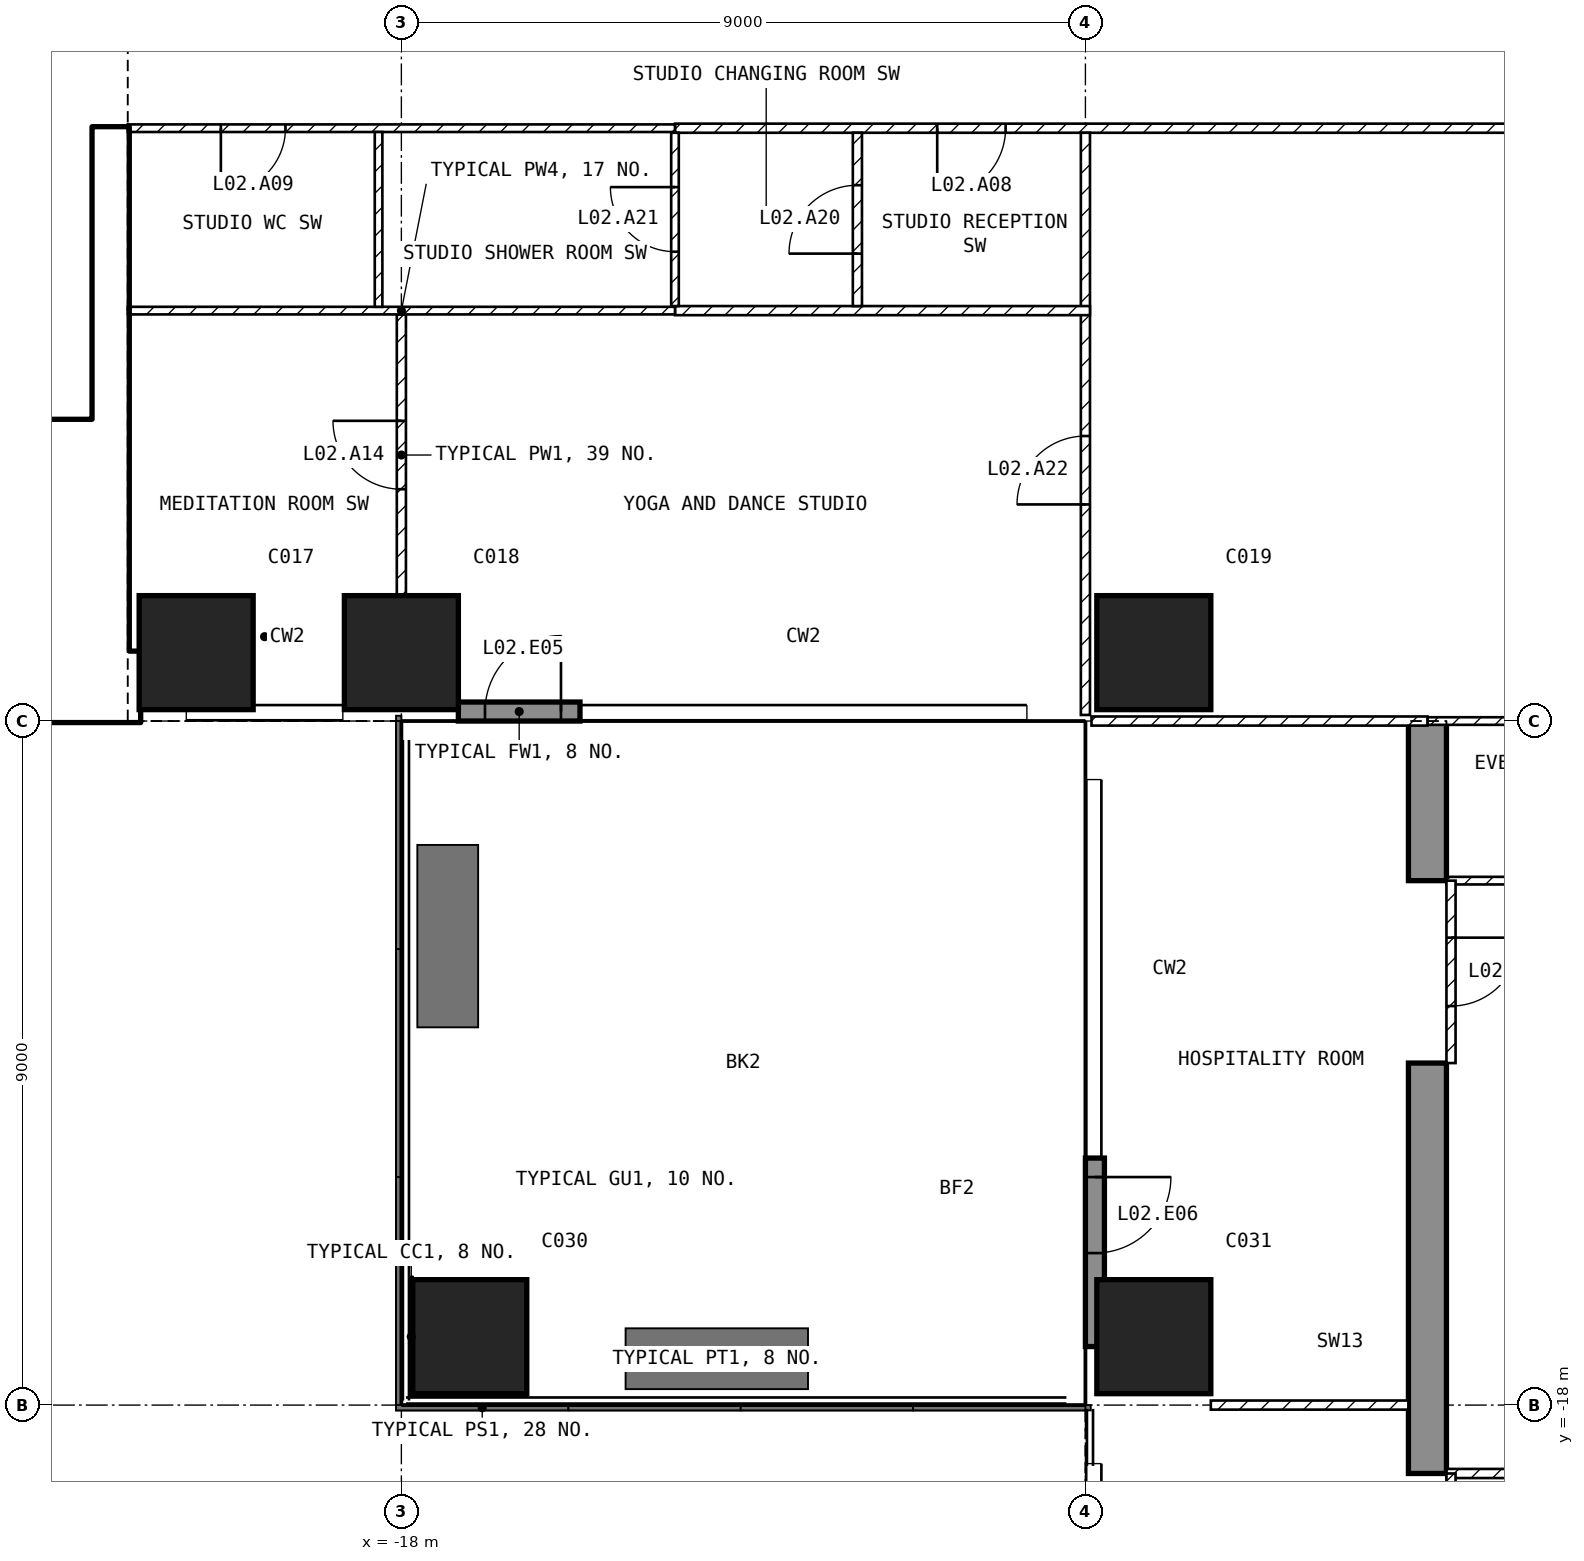
"""IFC4 building model, lengths in metres.
Left out: names, types, materials, properties, quantities, classifications, styles, units other than length and angle.
Written with IfcOpenShell. Run it as: python <this file> out.ifc"""

import sys

from ifc_helpers import new_model, si_unit, direction, frame, frame_2d, origin, origin_2d, place, context, subcontext, project, spatial, polyline, rectangle, outline, extrude, element, fill, save


model = new_model("IFC4")
c1 = context("Model", 3, precision=1e-05, world=origin(), true_north=direction((0.0, 1.0)))
c2 = subcontext(c1, "Body", "Model", "MODEL_VIEW")
j1 = project(units=[si_unit("LENGTHUNIT", "METRE"), si_unit("PLANEANGLEUNIT", "RADIAN")], contexts=[c1])
p1 = place(None, origin())
s1 = spatial("IfcSite", under=j1, at=p1, CompositionType="ELEMENT")
p2 = place(p1, origin())
s2 = spatial("IfcBuilding", under=s1, at=p2, CompositionType="ELEMENT")
p3 = place(p2, frame((0.0, 0.0, 21.0)))
s3 = spatial("IfcBuildingStorey", under=s2, at=p3, CompositionType="ELEMENT", Elevation=21.0)
for number, where, z_axis, x_axis in (
    (1, (-20.7, -8.1, -0.3), (0.0, 0.0, 1.0), (1.0, 0.0, 0.0)),
    (2, (-18.0, -8.1, -0.3), (0.0, 0.0, 1.0), (1.0, 0.0, 0.0)),
):
    element("IfcColumn", number, at=place(p3, frame(where, z_axis=z_axis, x_axis=x_axis)), inside=s3, PredefinedType="COLUMN", context=c2, shape_type="SweptSolid", body=[
        extrude(rectangle(XDim=1.5, YDim=1.5, at=origin_2d()), origin(), (0.0, 0.0, 1.0), 5.85),
    ])
for number, where, z_axis, x_axis in (
    (3, (-8.1, -17.1, -1.4), (0.0, 0.0, 1.0), (1.0, 0.0, 0.0)),
    (4, (-8.1, -8.1, -1.4), (0.0, 0.0, 1.0), (1.0, 0.0, 0.0)),
):
    element("IfcColumn", number, at=place(p3, frame(where, z_axis=z_axis, x_axis=x_axis)), inside=s3, PredefinedType="COLUMN", context=c2, shape_type="SweptSolid", body=[
        extrude(rectangle(XDim=1.5, YDim=1.5, at=origin_2d()), origin(), (0.0, 0.0, 1.0), 6.95),
    ])
p4 = place(p3, frame((-17.1, -17.1, -0.3), z_axis=(0.0, 0.0, 1.0), x_axis=(1.0, 0.0, 0.0)))
e5 = element("IfcColumn", 5, at=p4, inside=s3, PredefinedType="COLUMN", context=c2, shape_type="SweptSolid", body=[
    extrude(rectangle(XDim=1.5, YDim=1.5, at=origin_2d()), origin(), (0.0, 0.0, 1.0), 5.85),
])
p5 = place(p3, frame((-4.75, -25.35, -0.3), z_axis=(1.0, 0.0, 0.0), x_axis=(0.0, 1.0, 0.0)))
e6 = element("IfcWall", 6, at=p5, inside=s3, PredefinedType="SHEAR", context=c2, shape_type="SweptSolid", body=[
    extrude(outline(polyline([(0.0, 0.0), (4.05, 0.0), (4.05, 2.7), (6.45, 2.7), (6.45, 0.0), (11.85, 0.0), (11.85, 2.7), (14.25, 2.7), (14.25, 0.0), (16.35, 0.0), (16.35, 5.85), (0.0, 5.85), (0.0, 0.0)])), origin(), (0.0, 0.0, 1.0), 0.5),
])
p6 = place(p3, frame((-17.25, -8.875, 0.0), z_axis=(0.0, 0.0, 1.0), x_axis=(1.0, 0.0, 0.0)))
e7 = element("IfcWall", 7, at=p6, inside=s3, PredefinedType="SOLIDWALL", context=c2, shape_type="SweptSolid", body=[
    extrude(rectangle(XDim=1.6, YDim=0.25, at=frame_2d((0.8, 0.0))), origin(), (0.0, 0.0, 1.0), 5.55),
])
p7 = place(p6, frame((0.35, 0.0, 0.0)))
e8 = element("IfcOpeningElement", 8, at=p7, cuts=e7, PredefinedType="OPENING", context=c2, shape_type="SweptSolid", body=[
    extrude(rectangle(XDim=1.0, YDim=2.4, at=frame_2d((0.5, 1.2))), frame((0.0, 0.135, 0.0), z_axis=(0.0, -1.0, 0.0), x_axis=(1.0, 0.0, 0.0)), (0.0, 0.0, 1.0), 0.27),
])
p8 = place(p3, frame((-8.875, -14.75, 0.0), z_axis=(0.0, 0.0, 1.0), x_axis=(0.0, -1.0, 0.0)))
e9 = element("IfcWall", 9, at=p8, inside=s3, PredefinedType="SOLIDWALL", context=c2, shape_type="SweptSolid", body=[
    extrude(rectangle(XDim=2.48, YDim=0.25, at=frame_2d((1.24, 0.0))), origin(), (0.0, 0.0, 1.0), 5.55),
])
p9 = place(p8, frame((0.25, 0.0, 0.0)))
e10 = element("IfcOpeningElement", 10, at=p9, cuts=e9, PredefinedType="OPENING", context=c2, shape_type="SweptSolid", body=[
    extrude(rectangle(XDim=1.0, YDim=2.4, at=frame_2d((0.5, 1.2))), frame((0.0, 0.135, 0.0), z_axis=(0.0, -1.0, 0.0), x_axis=(1.0, 0.0, 0.0)), (0.0, 0.0, 1.0), 0.27),
])
p10 = place(p3, frame((-32.4, -8.55, 0.0), z_axis=(0.0, 0.0, 1.0), x_axis=(1.0, 0.0, 0.0)))
e11 = element("IfcWall", 11, at=p10, inside=s3, PredefinedType="SHEAR", context=c2, shape_type="SweptSolid", body=[
    extrude(rectangle(XDim=10.95, YDim=0.9, at=frame_2d((5.475, 0.0))), origin(), (0.0, 0.0, 1.0), 5.55),
])
p11 = place(p3, frame((-21.825, -8.1, 0.0), z_axis=(0.0, 0.0, 1.0), x_axis=(0.0, 1.0, 0.0)))
e12 = element("IfcWall", 12, at=p11, inside=s3, PredefinedType="SHEAR", context=c2, shape_type="SweptSolid", body=[
    extrude(rectangle(XDim=6.9, YDim=0.45, at=frame_2d((3.45, 0.0))), origin(), (0.0, 0.0, 1.0), 5.55),
])
p12 = place(p3, frame((-28.35, -5.15, 0.0), z_axis=(0.0, 0.0, 1.0), x_axis=(1.0, 0.0, 0.0)))
e13 = element("IfcWall", 13, at=p12, inside=s3, PredefinedType="SOLIDWALL", context=c2, shape_type="SweptSolid", body=[
    extrude(rectangle(XDim=6.3, YDim=0.2, at=frame_2d((3.15, 0.0))), origin(), (0.0, 0.0, 1.0), 5.55),
])
p13 = place(p12, frame((5.1, 0.0, 0.0)))
e14 = element("IfcOpeningElement", 14, at=p13, cuts=e13, PredefinedType="OPENING", context=c2, shape_type="SweptSolid", body=[
    extrude(rectangle(XDim=1.0, YDim=2.1, at=frame_2d((0.5, 1.05))), frame((0.0, 0.11, 0.0), z_axis=(0.0, -1.0, 0.0), x_axis=(1.0, 0.0, 0.0)), (0.0, 0.0, 1.0), 0.22),
])
p14 = place(p3, frame((18.6, -1.2, 0.0), z_axis=(0.0, 0.0, 1.0), x_axis=(-1.0, 0.0, 0.0)))
e15 = element("IfcWall", 15, at=p14, inside=s3, PredefinedType="PARTITIONING", context=c2, shape_type="SweptSolid", body=[
    extrude(rectangle(XDim=33.0, YDim=0.12, at=frame_2d((16.5, 0.0))), origin(), (0.0, 0.0, 1.0), 5.55),
])
p15 = place(p14, frame((17.7, 0.0, 0.0)))
e16 = element("IfcOpeningElement", 16, at=p15, cuts=e15, PredefinedType="OPENING", context=c2, shape_type="SweptSolid", body=[
    extrude(rectangle(XDim=1.8, YDim=2.1, at=frame_2d((0.9, 1.05))), frame((0.0, 0.07, 0.0), z_axis=(0.0, -1.0, 0.0), x_axis=(1.0, 0.0, 0.0)), (0.0, 0.0, 1.0), 0.14),
])
p16 = place(p14, frame((2.25, 0.0, 0.0)))
e17 = element("IfcOpeningElement", 17, at=p16, cuts=e15, PredefinedType="OPENING", context=c2, shape_type="SweptSolid", body=[
    extrude(rectangle(XDim=0.9, YDim=2.1, at=frame_2d((0.45, 1.05))), frame((0.0, 0.07, 0.0), z_axis=(0.0, -1.0, 0.0), x_axis=(1.0, 0.0, 0.0)), (0.0, 0.0, 1.0), 0.14),
])
p17 = place(p14, frame((28.65, 0.0, 0.0)))
e18 = element("IfcOpeningElement", 18, at=p17, cuts=e15, PredefinedType="OPENING", context=c2, shape_type="SweptSolid", body=[
    extrude(rectangle(XDim=0.9, YDim=2.1, at=frame_2d((0.45, 1.05))), frame((0.0, 0.07, 0.0), z_axis=(0.0, -1.0, 0.0), x_axis=(1.0, 0.0, 0.0)), (0.0, 0.0, 1.0), 0.14),
])
p18 = place(p3, frame((-14.4, -1.2, 0.0), z_axis=(0.0, 0.0, 1.0), x_axis=(-1.0, 0.0, 0.0)))
e19 = element("IfcWall", 19, at=p18, inside=s3, PredefinedType="PARTITIONING", context=c2, shape_type="SweptSolid", body=[
    extrude(rectangle(XDim=7.2, YDim=0.1, at=frame_2d((3.6, 0.0))), origin(), (0.0, 0.0, 1.0), 5.55),
])
p19 = place(p18, frame((5.125, 0.0, 0.0)))
e20 = element("IfcOpeningElement", 20, at=p19, cuts=e19, PredefinedType="OPENING", context=c2, shape_type="SweptSolid", body=[
    extrude(rectangle(XDim=0.85, YDim=2.1, at=frame_2d((0.425, 1.05))), frame((0.0, 0.06, 0.0), z_axis=(0.0, -1.0, 0.0), x_axis=(1.0, 0.0, 0.0)), (0.0, 0.0, 1.0), 0.12),
])
p20 = place(p3, frame((-9.0, -8.92, 0.0), z_axis=(0.0, 0.0, 1.0), x_axis=(0.0, 1.0, 0.0)))
e21 = element("IfcWall", 21, at=p20, inside=s3, PredefinedType="PARTITIONING", context=c2, shape_type="SweptSolid", body=[
    extrude(rectangle(XDim=7.66, YDim=0.12, at=frame_2d((3.83, 0.0))), origin(), (0.0, 0.0, 1.0), 5.55),
])
p21 = place(p20, frame((2.77, 0.0, 0.0)))
e22 = element("IfcOpeningElement", 22, at=p21, cuts=e21, PredefinedType="OPENING", context=c2, shape_type="SweptSolid", body=[
    extrude(rectangle(XDim=0.9, YDim=2.1, at=frame_2d((0.45, 1.05))), frame((0.0, 0.07, 0.0), z_axis=(0.0, -1.0, 0.0), x_axis=(1.0, 0.0, 0.0)), (0.0, 0.0, 1.0), 0.14),
])
p22 = place(p3, frame((-2.1, -9.0, 0.0), z_axis=(0.0, 0.0, 1.0), x_axis=(-1.0, 0.0, 0.0)))
e23 = element("IfcWall", 23, at=p22, inside=s3, PredefinedType="PARTITIONING", context=c2, shape_type="SweptSolid", body=[
    extrude(rectangle(XDim=2.4, YDim=0.1, at=frame_2d((1.2, 0.0))), origin(), (0.0, 0.0, 1.0), 5.55),
])
p23 = place(p3, frame((-4.5, -9.0, 0.0), z_axis=(0.0, 0.0, 1.0), x_axis=(-1.0, 0.0, 0.0)))
e24 = element("IfcWall", 24, at=p23, inside=s3, PredefinedType="PARTITIONING", context=c2, shape_type="SweptSolid", body=[
    extrude(rectangle(XDim=4.42, YDim=0.12, at=frame_2d((2.21, 0.0))), origin(), (0.0, 0.0, 1.0), 5.55),
])
p24 = place(p3, frame((-18.0, -7.35, 0.0), z_axis=(0.0, 0.0, 1.0), x_axis=(0.0, 1.0, 0.0)))
e25 = element("IfcWall", 25, at=p24, inside=s3, PredefinedType="PARTITIONING", context=c2, shape_type="SweptSolid", body=[
    extrude(rectangle(XDim=3.7, YDim=0.12, at=frame_2d((1.85, 0.0))), origin(), (0.0, 0.0, 1.0), 4.57),
])
p25 = place(p24, frame((1.4, 0.0, 0.0)))
e26 = element("IfcOpeningElement", 26, at=p25, cuts=e25, PredefinedType="OPENING", context=c2, shape_type="SweptSolid", body=[
    extrude(rectangle(XDim=0.9, YDim=2.1, at=frame_2d((0.45, 1.05))), frame((0.0, 0.07, 0.0), z_axis=(0.0, -1.0, 0.0), x_axis=(1.0, 0.0, 0.0)), (0.0, 0.0, 1.0), 0.14),
])
p26 = place(p3, frame((-14.4, -3.6, 0.0), z_axis=(0.0, 0.0, 1.0), x_axis=(1.0, 0.0, 0.0)))
e27 = element("IfcWall", 27, at=p26, inside=s3, PredefinedType="PARTITIONING", context=c2, shape_type="SweptSolid", body=[
    extrude(rectangle(XDim=5.46, YDim=0.12, at=frame_2d((2.73, 0.0))), origin(), (0.0, 0.0, 1.0), 5.55),
])
p27 = place(p3, frame((-21.6, -3.6, 0.0), z_axis=(0.0, 0.0, 1.0), x_axis=(1.0, 0.0, 0.0)))
e28 = element("IfcWall", 28, at=p27, inside=s3, PredefinedType="PARTITIONING", context=c2, shape_type="SweptSolid", body=[
    extrude(rectangle(XDim=7.2, YDim=0.1, at=frame_2d((3.6, 0.0))), origin(), (0.0, 0.0, 1.0), 5.55),
])
p28 = place(p3, frame((-12.0, -3.54, 0.0), z_axis=(0.0, 0.0, 1.0), x_axis=(0.0, 1.0, 0.0)))
e29 = element("IfcWall", 29, at=p28, inside=s3, PredefinedType="PARTITIONING", context=c2, shape_type="SweptSolid", body=[
    extrude(rectangle(XDim=2.28, YDim=0.12, at=frame_2d((1.14, 0.0))), origin(), (0.0, 0.0, 1.0), 5.55),
])
p29 = place(p28, frame((0.69, 0.0, 0.0)))
e30 = element("IfcOpeningElement", 30, at=p29, cuts=e29, PredefinedType="OPENING", context=c2, shape_type="SweptSolid", body=[
    extrude(rectangle(XDim=0.9, YDim=2.1, at=frame_2d((0.45, 1.05))), frame((0.0, 0.07, 0.0), z_axis=(0.0, -1.0, 0.0), x_axis=(1.0, 0.0, 0.0)), (0.0, 0.0, 1.0), 0.14),
])
p30 = place(p3, frame((-14.4, -3.54, 0.0), z_axis=(0.0, 0.0, 1.0), x_axis=(0.0, 1.0, 0.0)))
e31 = element("IfcWall", 31, at=p30, inside=s3, PredefinedType="PARTITIONING", context=c2, shape_type="SweptSolid", body=[
    extrude(rectangle(XDim=2.28, YDim=0.1, at=frame_2d((1.14, 0.0))), origin(), (0.0, 0.0, 1.0), 5.55),
])
p31 = place(p30, frame((0.715, 0.0, 0.0)))
e32 = element("IfcOpeningElement", 32, at=p31, cuts=e31, PredefinedType="OPENING", context=c2, shape_type="SweptSolid", body=[
    extrude(rectangle(XDim=0.85, YDim=2.1, at=frame_2d((0.425, 1.05))), frame((0.0, 0.06, 0.0), z_axis=(0.0, -1.0, 0.0), x_axis=(1.0, 0.0, 0.0)), (0.0, 0.0, 1.0), 0.12),
])
p32 = place(p3, frame((-18.3, -3.55, 0.0), z_axis=(0.0, 0.0, 1.0), x_axis=(0.0, 1.0, 0.0)))
e33 = element("IfcWall", 33, at=p32, inside=s3, PredefinedType="PARTITIONING", context=c2, shape_type="SweptSolid", body=[
    extrude(rectangle(XDim=2.3, YDim=0.1, at=frame_2d((1.15, 0.0))), origin(), (0.0, 0.0, 1.0), 5.55),
])
p33 = place(p3, frame((-2.1, -11.1, 0.0), z_axis=(0.0, 0.0, 1.0), x_axis=(-1.0, 0.0, 0.0)))
e34 = element("IfcWall", 34, at=p33, inside=s3, PredefinedType="PARTITIONING", context=c2, shape_type="SweptSolid", body=[
    extrude(rectangle(XDim=2.15, YDim=0.1, at=frame_2d((1.075, 0.0))), origin(), (0.0, 0.0, 1.0), 5.55),
])
p34 = place(p3, frame((4.25, -18.9, 0.0), z_axis=(0.0, 0.0, 1.0), x_axis=(-1.0, 0.0, 0.0)))
e35 = element("IfcWall", 35, at=p34, inside=s3, PredefinedType="PARTITIONING", context=c2, shape_type="SweptSolid", body=[
    extrude(rectangle(XDim=8.5, YDim=0.12, at=frame_2d((4.25, 0.0))), origin(), (0.0, 0.0, 1.0), 5.55),
])
p35 = place(p34, frame((5.675, 0.0, 0.0)))
e36 = element("IfcOpeningElement", 36, at=p35, cuts=e35, PredefinedType="OPENING", context=c2, shape_type="SweptSolid", body=[
    extrude(rectangle(XDim=0.9, YDim=2.1, at=frame_2d((0.45, 1.05))), frame((0.0, 0.07, 0.0), z_axis=(0.0, -1.0, 0.0), x_axis=(1.0, 0.0, 0.0)), (0.0, 0.0, 1.0), 0.14),
])
p36 = place(p3, frame((-4.75, -18.0, 0.0), z_axis=(0.0, 0.0, 1.0), x_axis=(-1.0, 0.0, 0.0)))
e37 = element("IfcWall", 37, at=p36, inside=s3, PredefinedType="PARTITIONING", context=c2, shape_type="SweptSolid", body=[
    extrude(rectangle(XDim=2.6, YDim=0.12, at=frame_2d((1.3, 0.0))), origin(), (0.0, 0.0, 1.0), 5.55),
])
p37 = place(p3, frame((-4.19, -11.1, 0.0), z_axis=(0.0, 0.0, 1.0), x_axis=(0.0, -1.0, 0.0)))
e38 = element("IfcWall", 38, at=p37, inside=s3, PredefinedType="PARTITIONING", context=c2, shape_type="SweptSolid", body=[
    extrude(rectangle(XDim=2.4, YDim=0.12, at=frame_2d((1.2, 0.0))), origin(), (0.0, 0.0, 1.0), 2.4),
])
p38 = place(p37, frame((0.75, 0.0, 0.0)))
e39 = element("IfcOpeningElement", 39, at=p38, cuts=e38, PredefinedType="OPENING", context=c2, shape_type="SweptSolid", body=[
    extrude(rectangle(XDim=0.9, YDim=2.1, at=frame_2d((0.45, 1.05))), frame((0.0, 0.07, 0.0), z_axis=(0.0, -1.0, 0.0), x_axis=(1.0, 0.0, 0.0)), (0.0, 0.0, 1.0), 0.14),
])
p39 = place(p3, frame((-4.19, -18.9, 0.0), z_axis=(0.0, 0.0, 1.0), x_axis=(0.0, -1.0, 0.0)))
e40 = element("IfcWall", 40, at=p39, inside=s3, PredefinedType="PARTITIONING", context=c2, shape_type="SweptSolid", body=[
    extrude(rectangle(XDim=2.4, YDim=0.12, at=frame_2d((1.2, 0.0))), origin(), (0.0, 0.0, 1.0), 2.4),
])
p40 = place(p39, frame((0.75, 0.0, 0.0)))
e41 = element("IfcOpeningElement", 41, at=p40, cuts=e40, PredefinedType="OPENING", context=c2, shape_type="SweptSolid", body=[
    extrude(rectangle(XDim=0.9, YDim=2.1, at=frame_2d((0.45, 1.05))), frame((0.0, 0.07, 0.0), z_axis=(0.0, -1.0, 0.0), x_axis=(1.0, 0.0, 0.0)), (0.0, 0.0, 1.0), 0.14),
])
p41 = place(p7, origin())
e42 = element("IfcDoor", 42, at=p41, inside=s3, OperationType="SINGLE_SWING_RIGHT", PredefinedType="DOOR", context=c2, shape_type="SweptSolid", body=[
    extrude(rectangle(XDim=1.0, YDim=2.4, at=frame_2d((0.5, 1.2))), frame((0.0, 0.025, 0.0), z_axis=(0.0, -1.0, 0.0), x_axis=(1.0, 0.0, 0.0)), (0.0, 0.0, 1.0), 0.05),
])
fill(e8, e42)
p42 = place(p9, origin())
e43 = element("IfcDoor", 43, at=p42, inside=s3, OperationType="SINGLE_SWING_LEFT", PredefinedType="DOOR", context=c2, shape_type="SweptSolid", body=[
    extrude(rectangle(XDim=1.0, YDim=2.4, at=frame_2d((0.5, 1.2))), frame((0.0, 0.025, 0.0), z_axis=(0.0, -1.0, 0.0), x_axis=(1.0, 0.0, 0.0)), (0.0, 0.0, 1.0), 0.05),
])
fill(e10, e43)
p43 = place(p13, origin())
e44 = element("IfcDoor", 44, at=p43, inside=s3, OperationType="SINGLE_SWING_LEFT", PredefinedType="DOOR", context=c2, shape_type="SweptSolid", body=[
    extrude(rectangle(XDim=1.0, YDim=2.1, at=frame_2d((0.5, 1.05))), frame((0.0, 0.025, 0.0), z_axis=(0.0, -1.0, 0.0), x_axis=(1.0, 0.0, 0.0)), (0.0, 0.0, 1.0), 0.05),
])
fill(e14, e44)
p44 = place(p17, origin())
e45 = element("IfcDoor", 45, at=p44, inside=s3, OperationType="SINGLE_SWING_RIGHT", PredefinedType="DOOR", context=c2, shape_type="SweptSolid", body=[
    extrude(rectangle(XDim=0.9, YDim=2.1, at=frame_2d((0.45, 1.05))), frame((0.0, 0.025, 0.0), z_axis=(0.0, -1.0, 0.0), x_axis=(1.0, 0.0, 0.0)), (0.0, 0.0, 1.0), 0.05),
])
fill(e18, e45)
p45 = place(p19, origin())
e46 = element("IfcDoor", 46, at=p45, inside=s3, OperationType="SINGLE_SWING_RIGHT", PredefinedType="DOOR", context=c2, shape_type="SweptSolid", body=[
    extrude(rectangle(XDim=0.85, YDim=2.1, at=frame_2d((0.425, 1.05))), frame((0.0, 0.025, 0.0), z_axis=(0.0, -1.0, 0.0), x_axis=(1.0, 0.0, 0.0)), (0.0, 0.0, 1.0), 0.05),
])
fill(e20, e46)
p46 = place(p25, origin())
e47 = element("IfcDoor", 47, at=p46, inside=s3, OperationType="SINGLE_SWING_RIGHT", PredefinedType="DOOR", context=c2, shape_type="SweptSolid", body=[
    extrude(rectangle(XDim=0.9, YDim=2.1, at=frame_2d((0.45, 1.05))), frame((0.0, 0.025, 0.0), z_axis=(0.0, -1.0, 0.0), x_axis=(1.0, 0.0, 0.0)), (0.0, 0.0, 1.0), 0.05),
])
fill(e26, e47)
p47 = place(p29, origin())
e48 = element("IfcDoor", 48, at=p47, inside=s3, OperationType="SINGLE_SWING_LEFT", PredefinedType="DOOR", context=c2, shape_type="SweptSolid", body=[
    extrude(rectangle(XDim=0.9, YDim=2.1, at=frame_2d((0.45, 1.05))), frame((0.0, 0.025, 0.0), z_axis=(0.0, -1.0, 0.0), x_axis=(1.0, 0.0, 0.0)), (0.0, 0.0, 1.0), 0.05),
])
fill(e30, e48)
p48 = place(p31, origin())
e49 = element("IfcDoor", 49, at=p48, inside=s3, OperationType="SINGLE_SWING_RIGHT", PredefinedType="DOOR", context=c2, shape_type="SweptSolid", body=[
    extrude(rectangle(XDim=0.85, YDim=2.1, at=frame_2d((0.425, 1.05))), frame((0.0, 0.025, 0.0), z_axis=(0.0, -1.0, 0.0), x_axis=(1.0, 0.0, 0.0)), (0.0, 0.0, 1.0), 0.05),
])
fill(e32, e49)
p49 = place(p21, origin())
e50 = element("IfcDoor", 50, at=p49, inside=s3, OperationType="SINGLE_SWING_LEFT", PredefinedType="DOOR", context=c2, shape_type="SweptSolid", body=[
    extrude(rectangle(XDim=0.9, YDim=2.1, at=frame_2d((0.45, 1.05))), frame((0.0, 0.025, 0.0), z_axis=(0.0, -1.0, 0.0), x_axis=(1.0, 0.0, 0.0)), (0.0, 0.0, 1.0), 0.05),
])
fill(e22, e50)
p50 = place(p38, origin())
e51 = element("IfcDoor", 51, at=p50, inside=s3, OperationType="SINGLE_SWING_LEFT", PredefinedType="DOOR", context=c2, shape_type="SweptSolid", body=[
    extrude(rectangle(XDim=0.9, YDim=2.1, at=frame_2d((0.45, 1.05))), frame((0.0, 0.025, 0.0), z_axis=(0.0, -1.0, 0.0), x_axis=(1.0, 0.0, 0.0)), (0.0, 0.0, 1.0), 0.05),
])
fill(e39, e51)
save(model, sys.argv[1])
